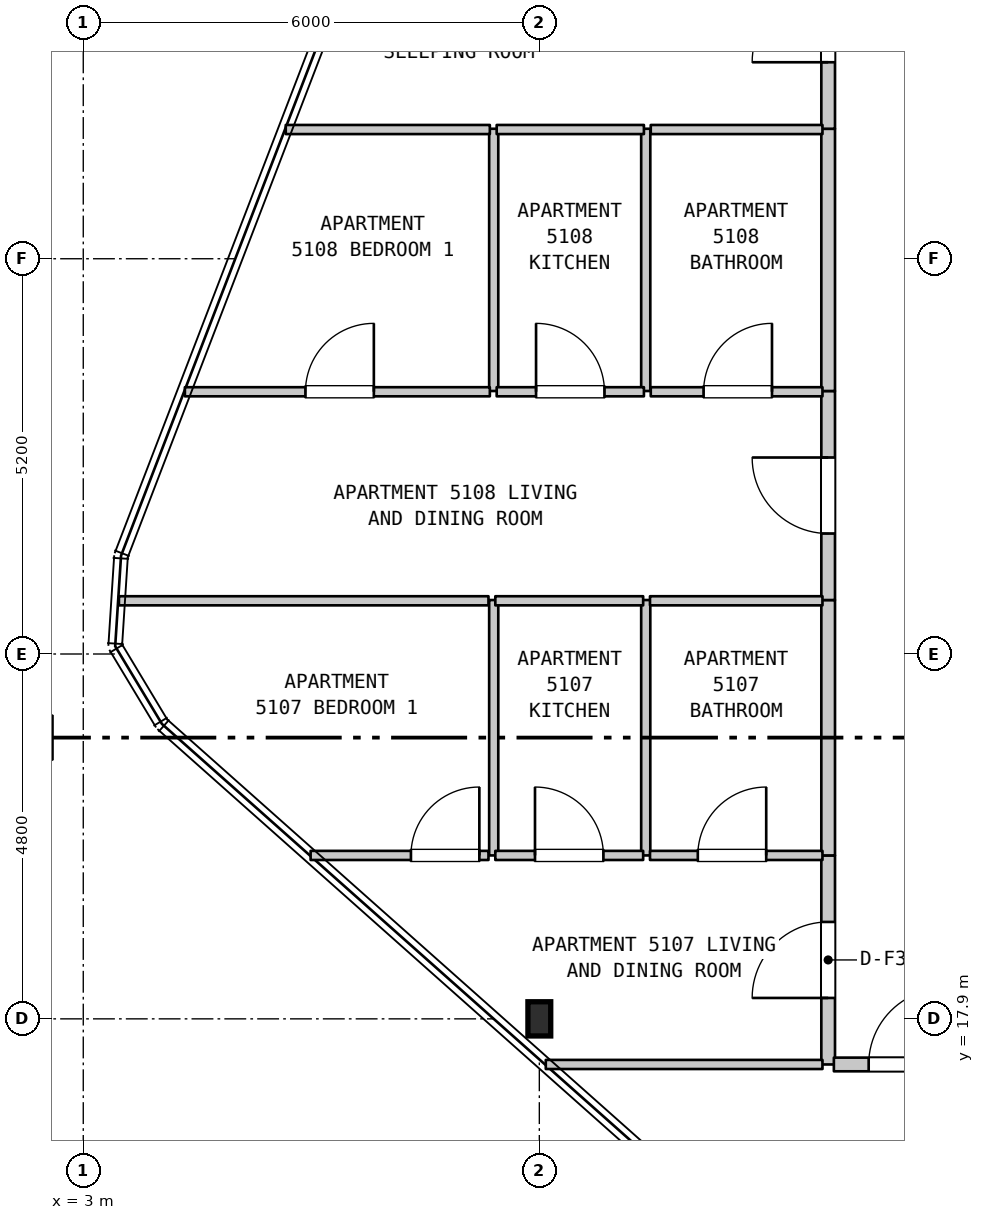
"""IFC4 building model, lengths in metres.
Left out: names, types, materials, properties, quantities, classifications, styles, units other than length and angle.
Written with IfcOpenShell. Run it as: python <this file> out.ifc"""

import sys

from ifc_helpers import new_model, si_unit, direction, frame, frame_2d, origin, origin_2d, place, context, subcontext, project, spatial, rectangle, i_section, extrude, element, fill, save


model = new_model("IFC4")
c1 = context("Model", 3, precision=1e-05, world=origin(), true_north=direction((0.0, 1.0)))
c2 = subcontext(c1, "Body", "Model", "MODEL_VIEW")
j1 = project(units=[si_unit("LENGTHUNIT", "METRE"), si_unit("PLANEANGLEUNIT", "RADIAN")], contexts=[c1])
p1 = place(None, origin())
s1 = spatial("IfcSite", under=j1, at=p1, CompositionType="ELEMENT")
p2 = place(p1, origin())
s2 = spatial("IfcBuilding", under=s1, at=p2, CompositionType="ELEMENT")
p3 = place(p2, frame((0.0, 0.0, 206.9)))
s3 = spatial("IfcBuildingStorey", under=s2, at=p3, CompositionType="ELEMENT", Elevation=206.9)
p4 = place(p3, frame((9.0, 17.9, 0.0), z_axis=(0.0, 0.0, 1.0), x_axis=(1.0, 0.0, 0.0)))
e1 = element("IfcColumn", 1, at=p4, inside=s3, PredefinedType="COLUMN", context=c2, shape_type="SweptSolid", body=[
    extrude(i_section(OverallWidth=0.3, OverallDepth=0.45, WebThickness=0.014, FlangeThickness=0.026, FilletRadius=0.027, at=origin_2d()), origin(), (0.0, 0.0, 1.0), 3.7),
])
p5 = place(p3, frame((8.4, 20.05, 0.0), z_axis=(0.0, 0.0, 1.0), x_axis=(0.0, 1.0, 0.0)))
e2 = element("IfcWall", 2, at=p5, inside=s3, PredefinedType="PARTITIONING", context=c2, shape_type="SweptSolid", body=[
    extrude(rectangle(XDim=3.36, YDim=0.12, at=frame_2d((1.68, 0.0))), origin(), (0.0, 0.0, 1.0), 3.39),
])
p6 = place(p3, frame((8.4, 26.16, 0.0), z_axis=(0.0, 0.0, 1.0), x_axis=(0.0, 1.0, 0.0)))
e3 = element("IfcWall", 3, at=p6, inside=s3, PredefinedType="PARTITIONING", context=c2, shape_type="SweptSolid", body=[
    extrude(rectangle(XDim=3.45, YDim=0.12, at=frame_2d((1.725, 0.0))), origin(), (0.0, 0.0, 1.0), 3.39),
])
p7 = place(p3, frame((10.4, 20.05, 0.0), z_axis=(0.0, 0.0, 1.0), x_axis=(0.0, 1.0, 0.0)))
e4 = element("IfcWall", 4, at=p7, inside=s3, PredefinedType="PARTITIONING", context=c2, shape_type="SweptSolid", body=[
    extrude(rectangle(XDim=3.36, YDim=0.12, at=frame_2d((1.68, 0.0))), origin(), (0.0, 0.0, 1.0), 3.39),
])
p8 = place(p3, frame((10.4, 26.16, 0.0), z_axis=(0.0, 0.0, 1.0), x_axis=(0.0, 1.0, 0.0)))
e5 = element("IfcWall", 5, at=p8, inside=s3, PredefinedType="PARTITIONING", context=c2, shape_type="SweptSolid", body=[
    extrude(rectangle(XDim=3.45, YDim=0.12, at=frame_2d((1.725, 0.0))), origin(), (0.0, 0.0, 1.0), 3.39),
])
p9 = place(p3, frame((12.8, 17.3, 0.0), z_axis=(0.0, 0.0, 1.0), x_axis=(0.0, 1.0, 0.0)))
e6 = element("IfcWall", 6, at=p9, inside=s3, PredefinedType="STANDARD", context=c2, shape_type="SweptSolid", body=[
    extrude(rectangle(XDim=2.75, YDim=0.18, at=frame_2d((1.375, 0.0))), origin(), (0.0, 0.0, 1.0), 3.39),
])
p10 = place(p9, frame((0.875, 0.0, 0.0)))
e7 = element("IfcOpeningElement", 7, at=p10, cuts=e6, PredefinedType="OPENING", context=c2, shape_type="SweptSolid", body=[
    extrude(rectangle(XDim=1.0, YDim=2.15, at=frame_2d((0.5, 1.075))), frame((0.0, 0.1, 0.0), z_axis=(0.0, -1.0, 0.0), x_axis=(1.0, 0.0, 0.0)), (0.0, 0.0, 1.0), 0.2),
])
p11 = place(p3, frame((12.8, 20.05, 0.0), z_axis=(0.0, 0.0, 1.0), x_axis=(0.0, 1.0, 0.0)))
e8 = element("IfcWall", 8, at=p11, inside=s3, PredefinedType="STANDARD", context=c2, shape_type="SweptSolid", body=[
    extrude(rectangle(XDim=3.36, YDim=0.18, at=frame_2d((1.68, 0.0))), origin(), (0.0, 0.0, 1.0), 3.39),
])
p12 = place(p3, frame((12.8, 23.41, 0.0), z_axis=(0.0, 0.0, 1.0), x_axis=(0.0, 1.0, 0.0)))
e9 = element("IfcWall", 9, at=p12, inside=s3, PredefinedType="STANDARD", context=c2, shape_type="SweptSolid", body=[
    extrude(rectangle(XDim=2.75, YDim=0.18, at=frame_2d((1.375, 0.0))), origin(), (0.0, 0.0, 1.0), 3.39),
])
p13 = place(p12, frame((0.875, 0.0, 0.0)))
e10 = element("IfcOpeningElement", 10, at=p13, cuts=e9, PredefinedType="OPENING", context=c2, shape_type="SweptSolid", body=[
    extrude(rectangle(XDim=1.0, YDim=2.15, at=frame_2d((0.5, 1.075))), frame((0.0, 0.1, 0.0), z_axis=(0.0, -1.0, 0.0), x_axis=(1.0, 0.0, 0.0)), (0.0, 0.0, 1.0), 0.2),
])
p14 = place(p3, frame((12.8, 26.16, 0.0), z_axis=(0.0, 0.0, 1.0), x_axis=(0.0, 1.0, 0.0)))
e11 = element("IfcWall", 11, at=p14, inside=s3, PredefinedType="STANDARD", context=c2, shape_type="SweptSolid", body=[
    extrude(rectangle(XDim=3.45, YDim=0.18, at=frame_2d((1.725, 0.0))), origin(), (0.0, 0.0, 1.0), 3.39),
])
p15 = place(p3, frame((12.8, 29.61, 0.0), z_axis=(0.0, 0.0, 1.0), x_axis=(0.0, 1.0, 0.0)))
e12 = element("IfcWall", 12, at=p15, inside=s3, PredefinedType="STANDARD", context=c2, shape_type="SweptSolid", body=[
    extrude(rectangle(XDim=2.75, YDim=0.18, at=frame_2d((1.375, 0.0))), origin(), (0.0, 0.0, 1.0), 3.39),
])
p16 = place(p15, frame((0.875, 0.0, 0.0)))
e13 = element("IfcOpeningElement", 13, at=p16, cuts=e12, PredefinedType="OPENING", context=c2, shape_type="SweptSolid", body=[
    extrude(rectangle(XDim=1.0, YDim=2.15, at=frame_2d((0.5, 1.075))), frame((0.0, 0.1, 0.0), z_axis=(0.0, -1.0, 0.0), x_axis=(1.0, 0.0, 0.0)), (0.0, 0.0, 1.0), 0.2),
])
p17 = place(p3, frame((9.085, 17.3, 0.0), z_axis=(0.0, 0.0, 1.0), x_axis=(1.0, 0.0, 0.0)))
e14 = element("IfcWall", 14, at=p17, inside=s3, PredefinedType="PARTITIONING", context=c2, shape_type="SweptSolid", body=[
    extrude(rectangle(XDim=3.64, YDim=0.12, at=frame_2d((1.82, 0.0))), origin(), (0.0, 0.0, 1.0), 3.39),
])
p18 = place(p3, frame((12.875, 17.3, 0.0), z_axis=(0.0, 0.0, 1.0), x_axis=(1.0, 0.0, 0.0)))
e15 = element("IfcWall", 15, at=p18, inside=s3, PredefinedType="STANDARD", context=c2, shape_type="SweptSolid", body=[
    extrude(rectangle(XDim=3.78, YDim=0.18, at=frame_2d((1.89, 0.0))), origin(), (0.0, 0.0, 1.0), 3.39),
])
p19 = place(p18, frame((0.458, 0.0, 0.0)))
e16 = element("IfcOpeningElement", 16, at=p19, cuts=e15, PredefinedType="OPENING", context=c2, shape_type="SweptSolid", body=[
    extrude(rectangle(XDim=1.0, YDim=2.15, at=frame_2d((0.5, 1.075))), frame((0.0, 0.1, 0.0), z_axis=(0.0, -1.0, 0.0), x_axis=(1.0, 0.0, 0.0)), (0.0, 0.0, 1.0), 0.2),
])
p20 = place(p3, frame((5.991, 20.05, 0.0), z_axis=(0.0, 0.0, 1.0), x_axis=(1.0, 0.0, 0.0)))
e17 = element("IfcWall", 17, at=p20, inside=s3, PredefinedType="PARTITIONING", context=c2, shape_type="SweptSolid", body=[
    extrude(rectangle(XDim=2.34, YDim=0.12, at=frame_2d((1.17, 0.0))), origin(), (0.0, 0.0, 1.0), 3.39),
])
p21 = place(p20, frame((1.32, 0.0, 0.0)))
e18 = element("IfcOpeningElement", 18, at=p21, cuts=e17, PredefinedType="OPENING", context=c2, shape_type="SweptSolid", body=[
    extrude(rectangle(XDim=0.9, YDim=2.15, at=frame_2d((0.45, 1.075))), frame((0.0, 0.07, 0.0), z_axis=(0.0, -1.0, 0.0), x_axis=(1.0, 0.0, 0.0)), (0.0, 0.0, 1.0), 0.14),
])
p22 = place(p3, frame((8.421, 20.05, 0.0), z_axis=(0.0, 0.0, 1.0), x_axis=(1.0, 0.0, 0.0)))
e19 = element("IfcWall", 19, at=p22, inside=s3, PredefinedType="PARTITIONING", context=c2, shape_type="SweptSolid", body=[
    extrude(rectangle(XDim=1.945, YDim=0.12, at=frame_2d((0.973, 0.0))), origin(), (0.0, 0.0, 1.0), 3.39),
])
p23 = place(p22, frame((0.522, 0.0, 0.0)))
e20 = element("IfcOpeningElement", 20, at=p23, cuts=e19, PredefinedType="OPENING", context=c2, shape_type="SweptSolid", body=[
    extrude(rectangle(XDim=0.9, YDim=2.15, at=frame_2d((0.45, 1.075))), frame((0.0, 0.07, 0.0), z_axis=(0.0, -1.0, 0.0), x_axis=(1.0, 0.0, 0.0)), (0.0, 0.0, 1.0), 0.14),
])
p24 = place(p3, frame((10.456, 20.05, 0.0), z_axis=(0.0, 0.0, 1.0), x_axis=(1.0, 0.0, 0.0)))
e21 = element("IfcWall", 21, at=p24, inside=s3, PredefinedType="PARTITIONING", context=c2, shape_type="SweptSolid", body=[
    extrude(rectangle(XDim=2.269, YDim=0.12, at=frame_2d((1.135, 0.0))), origin(), (0.0, 0.0, 1.0), 3.39),
])
p25 = place(p24, frame((0.629, 0.0, 0.0)))
e22 = element("IfcOpeningElement", 22, at=p25, cuts=e21, PredefinedType="OPENING", context=c2, shape_type="SweptSolid", body=[
    extrude(rectangle(XDim=0.9, YDim=2.1, at=frame_2d((0.45, 1.05))), frame((0.0, 0.07, 0.0), z_axis=(0.0, -1.0, 0.0), x_axis=(1.0, 0.0, 0.0)), (0.0, 0.0, 1.0), 0.14),
])
p26 = place(p3, frame((3.469, 23.4, 0.0), z_axis=(0.0, 0.0, 1.0), x_axis=(1.0, 0.0, 0.0)))
e23 = element("IfcWall", 23, at=p26, inside=s3, PredefinedType="PARTITIONING", context=c2, shape_type="SweptSolid", body=[
    extrude(rectangle(XDim=4.862, YDim=0.12, at=frame_2d((2.431, 0.0))), origin(), (0.0, 0.0, 1.0), 3.39),
])
p27 = place(p3, frame((8.421, 23.4, 0.0), z_axis=(0.0, 0.0, 1.0), x_axis=(1.0, 0.0, 0.0)))
e24 = element("IfcWall", 24, at=p27, inside=s3, PredefinedType="PARTITIONING", context=c2, shape_type="SweptSolid", body=[
    extrude(rectangle(XDim=1.945, YDim=0.12, at=frame_2d((0.973, 0.0))), origin(), (0.0, 0.0, 1.0), 3.39),
])
p28 = place(p3, frame((10.456, 23.4, 0.0), z_axis=(0.0, 0.0, 1.0), x_axis=(1.0, 0.0, 0.0)))
e25 = element("IfcWall", 25, at=p28, inside=s3, PredefinedType="PARTITIONING", context=c2, shape_type="SweptSolid", body=[
    extrude(rectangle(XDim=2.269, YDim=0.12, at=frame_2d((1.135, 0.0))), origin(), (0.0, 0.0, 1.0), 3.39),
])
p29 = place(p3, frame((4.337, 26.15, 0.0), z_axis=(0.0, 0.0, 1.0), x_axis=(1.0, 0.0, 0.0)))
e26 = element("IfcWall", 26, at=p29, inside=s3, PredefinedType="PARTITIONING", context=c2, shape_type="SweptSolid", body=[
    extrude(rectangle(XDim=4.012, YDim=0.12, at=frame_2d((2.006, 0.0))), origin(), (0.0, 0.0, 1.0), 3.39),
])
p30 = place(p29, frame((1.586, 0.0, 0.0)))
e27 = element("IfcOpeningElement", 27, at=p30, cuts=e26, PredefinedType="OPENING", context=c2, shape_type="SweptSolid", body=[
    extrude(rectangle(XDim=0.9, YDim=2.15, at=frame_2d((0.45, 1.075))), frame((0.0, 0.07, 0.0), z_axis=(0.0, -1.0, 0.0), x_axis=(1.0, 0.0, 0.0)), (0.0, 0.0, 1.0), 0.14),
])
p31 = place(p3, frame((8.439, 26.15, 0.0), z_axis=(0.0, 0.0, 1.0), x_axis=(1.0, 0.0, 0.0)))
e28 = element("IfcWall", 28, at=p31, inside=s3, PredefinedType="PARTITIONING", context=c2, shape_type="SweptSolid", body=[
    extrude(rectangle(XDim=1.937, YDim=0.12, at=frame_2d((0.969, 0.0))), origin(), (0.0, 0.0, 1.0), 3.39),
])
p32 = place(p31, frame((0.518, 0.0, 0.0)))
e29 = element("IfcOpeningElement", 29, at=p32, cuts=e28, PredefinedType="OPENING", context=c2, shape_type="SweptSolid", body=[
    extrude(rectangle(XDim=0.9, YDim=2.15, at=frame_2d((0.45, 1.075))), frame((0.0, 0.07, 0.0), z_axis=(0.0, -1.0, 0.0), x_axis=(1.0, 0.0, 0.0)), (0.0, 0.0, 1.0), 0.14),
])
p33 = place(p3, frame((10.466, 26.15, 0.0), z_axis=(0.0, 0.0, 1.0), x_axis=(1.0, 0.0, 0.0)))
e30 = element("IfcWall", 30, at=p33, inside=s3, PredefinedType="PARTITIONING", context=c2, shape_type="SweptSolid", body=[
    extrude(rectangle(XDim=2.259, YDim=0.12, at=frame_2d((1.129, 0.0))), origin(), (0.0, 0.0, 1.0), 3.39),
])
p34 = place(p33, frame((0.695, 0.0, 0.0)))
e31 = element("IfcOpeningElement", 31, at=p34, cuts=e30, PredefinedType="OPENING", context=c2, shape_type="SweptSolid", body=[
    extrude(rectangle(XDim=0.9, YDim=2.1, at=frame_2d((0.45, 1.05))), frame((0.0, 0.07, 0.0), z_axis=(0.0, -1.0, 0.0), x_axis=(1.0, 0.0, 0.0)), (0.0, 0.0, 1.0), 0.14),
])
p35 = place(p3, frame((5.664, 29.6, 0.0), z_axis=(0.0, 0.0, 1.0), x_axis=(1.0, 0.0, 0.0)))
e32 = element("IfcWall", 32, at=p35, inside=s3, PredefinedType="PARTITIONING", context=c2, shape_type="SweptSolid", body=[
    extrude(rectangle(XDim=2.685, YDim=0.12, at=frame_2d((1.343, 0.0))), origin(), (0.0, 0.0, 1.0), 3.39),
])
p36 = place(p3, frame((8.439, 29.6, 0.0), z_axis=(0.0, 0.0, 1.0), x_axis=(1.0, 0.0, 0.0)))
e33 = element("IfcWall", 33, at=p36, inside=s3, PredefinedType="PARTITIONING", context=c2, shape_type="SweptSolid", body=[
    extrude(rectangle(XDim=1.937, YDim=0.12, at=frame_2d((0.969, 0.0))), origin(), (0.0, 0.0, 1.0), 3.39),
])
p37 = place(p3, frame((10.466, 29.6, 0.0), z_axis=(0.0, 0.0, 1.0), x_axis=(1.0, 0.0, 0.0)))
e34 = element("IfcWall", 34, at=p37, inside=s3, PredefinedType="PARTITIONING", context=c2, shape_type="SweptSolid", body=[
    extrude(rectangle(XDim=2.259, YDim=0.12, at=frame_2d((1.129, 0.0))), origin(), (0.0, 0.0, 1.0), 3.39),
])
p38 = place(p10, origin())
e35 = element("IfcDoor", 35, at=p38, inside=s3, OperationType="SINGLE_SWING_LEFT", PredefinedType="DOOR", context=c2, shape_type="SweptSolid", body=[
    extrude(rectangle(XDim=1.0, YDim=2.15, at=frame_2d((0.5, 1.075))), frame((0.0, 0.025, 0.0), z_axis=(0.0, -1.0, 0.0), x_axis=(1.0, 0.0, 0.0)), (0.0, 0.0, 1.0), 0.05),
])
fill(e7, e35)
p39 = place(p13, origin())
e36 = element("IfcDoor", 36, at=p39, inside=s3, OperationType="SINGLE_SWING_RIGHT", PredefinedType="DOOR", context=c2, shape_type="SweptSolid", body=[
    extrude(rectangle(XDim=1.0, YDim=2.15, at=frame_2d((0.5, 1.075))), frame((0.0, 0.025, 0.0), z_axis=(0.0, -1.0, 0.0), x_axis=(1.0, 0.0, 0.0)), (0.0, 0.0, 1.0), 0.05),
])
fill(e10, e36)
p40 = place(p16, origin())
e37 = element("IfcDoor", 37, at=p40, inside=s3, OperationType="SINGLE_SWING_LEFT", PredefinedType="DOOR", context=c2, shape_type="SweptSolid", body=[
    extrude(rectangle(XDim=1.0, YDim=2.15, at=frame_2d((0.5, 1.075))), frame((0.0, 0.025, 0.0), z_axis=(0.0, -1.0, 0.0), x_axis=(1.0, 0.0, 0.0)), (0.0, 0.0, 1.0), 0.05),
])
fill(e13, e37)
p41 = place(p19, origin())
e38 = element("IfcDoor", 38, at=p41, inside=s3, OperationType="SINGLE_SWING_RIGHT", PredefinedType="DOOR", context=c2, shape_type="SweptSolid", body=[
    extrude(rectangle(XDim=1.0, YDim=2.15, at=frame_2d((0.5, 1.075))), frame((0.0, 0.025, 0.0), z_axis=(0.0, -1.0, 0.0), x_axis=(1.0, 0.0, 0.0)), (0.0, 0.0, 1.0), 0.05),
])
fill(e16, e38)
p42 = place(p21, origin())
e39 = element("IfcDoor", 39, at=p42, inside=s3, OperationType="SINGLE_SWING_RIGHT", PredefinedType="DOOR", context=c2, shape_type="SweptSolid", body=[
    extrude(rectangle(XDim=0.9, YDim=2.15, at=frame_2d((0.45, 1.075))), frame((0.0, 0.025, 0.0), z_axis=(0.0, -1.0, 0.0), x_axis=(1.0, 0.0, 0.0)), (0.0, 0.0, 1.0), 0.05),
])
fill(e18, e39)
p43 = place(p23, origin())
e40 = element("IfcDoor", 40, at=p43, inside=s3, OperationType="SINGLE_SWING_LEFT", PredefinedType="DOOR", context=c2, shape_type="SweptSolid", body=[
    extrude(rectangle(XDim=0.9, YDim=2.15, at=frame_2d((0.45, 1.075))), frame((0.0, 0.025, 0.0), z_axis=(0.0, -1.0, 0.0), x_axis=(1.0, 0.0, 0.0)), (0.0, 0.0, 1.0), 0.05),
])
fill(e20, e40)
p44 = place(p25, origin())
e41 = element("IfcDoor", 41, at=p44, inside=s3, OperationType="SINGLE_SWING_RIGHT", PredefinedType="DOOR", context=c2, shape_type="SweptSolid", body=[
    extrude(rectangle(XDim=0.9, YDim=2.1, at=frame_2d((0.45, 1.05))), frame((0.0, 0.025, 0.0), z_axis=(0.0, -1.0, 0.0), x_axis=(1.0, 0.0, 0.0)), (0.0, 0.0, 1.0), 0.05),
])
fill(e22, e41)
p45 = place(p30, origin())
e42 = element("IfcDoor", 42, at=p45, inside=s3, OperationType="SINGLE_SWING_RIGHT", PredefinedType="DOOR", context=c2, shape_type="SweptSolid", body=[
    extrude(rectangle(XDim=0.9, YDim=2.15, at=frame_2d((0.45, 1.075))), frame((0.0, 0.025, 0.0), z_axis=(0.0, -1.0, 0.0), x_axis=(1.0, 0.0, 0.0)), (0.0, 0.0, 1.0), 0.05),
])
fill(e27, e42)
p46 = place(p32, origin())
e43 = element("IfcDoor", 43, at=p46, inside=s3, OperationType="SINGLE_SWING_LEFT", PredefinedType="DOOR", context=c2, shape_type="SweptSolid", body=[
    extrude(rectangle(XDim=0.9, YDim=2.15, at=frame_2d((0.45, 1.075))), frame((0.0, 0.025, 0.0), z_axis=(0.0, -1.0, 0.0), x_axis=(1.0, 0.0, 0.0)), (0.0, 0.0, 1.0), 0.05),
])
fill(e29, e43)
p47 = place(p34, origin())
e44 = element("IfcDoor", 44, at=p47, inside=s3, OperationType="SINGLE_SWING_RIGHT", PredefinedType="DOOR", context=c2, shape_type="SweptSolid", body=[
    extrude(rectangle(XDim=0.9, YDim=2.1, at=frame_2d((0.45, 1.05))), frame((0.0, 0.025, 0.0), z_axis=(0.0, -1.0, 0.0), x_axis=(1.0, 0.0, 0.0)), (0.0, 0.0, 1.0), 0.05),
])
fill(e31, e44)
save(model, sys.argv[1])
